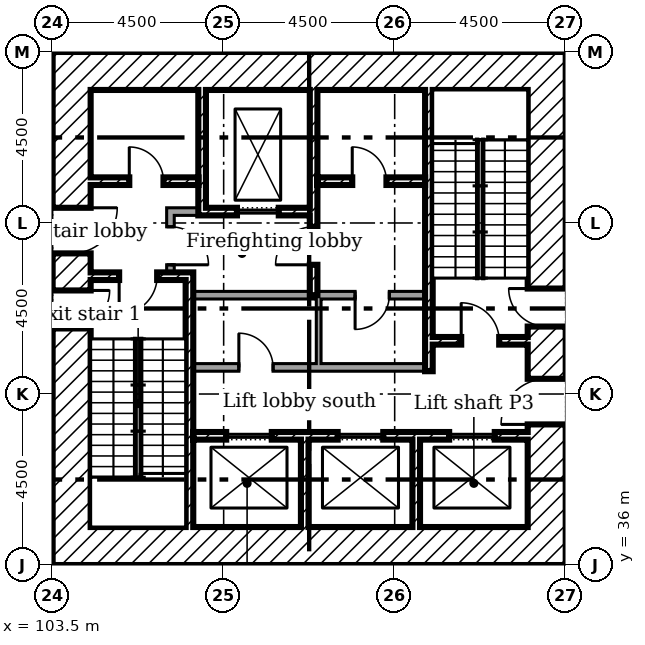
"""IFC4 building model, lengths in metres.
Left out: names, types, materials, properties, quantities, classifications, styles, units other than length and angle.
Written with IfcOpenShell. Run it as: python <this file> out.ifc"""

import sys

from ifc_helpers import new_model, si_unit, direction, frame, frame_2d, origin, place, context, subcontext, project, spatial, rectangle, extrude, element, fill, save


model = new_model("IFC4")
c1 = context("Model", 3, precision=1e-05, world=origin(), true_north=direction((0.0, 1.0)))
c2 = subcontext(c1, "Body", "Model", "MODEL_VIEW")
j1 = project(units=[si_unit("LENGTHUNIT", "METRE"), si_unit("PLANEANGLEUNIT", "RADIAN")], contexts=[c1])
p1 = place(None, origin())
s1 = spatial("IfcSite", under=j1, at=p1, CompositionType="ELEMENT")
p2 = place(p1, origin())
s2 = spatial("IfcBuilding", under=s1, at=p2, CompositionType="ELEMENT")
p3 = place(p2, frame((0.0, 0.0, 11.5)))
s3 = spatial("IfcBuildingStorey", under=s2, at=p3, CompositionType="ELEMENT", Elevation=11.5)
p4 = place(p3, frame((116.5, 36.0, 0.0), z_axis=(0.0, 0.0, 1.0), x_axis=(0.0, 1.0, 0.0)))
e1 = element("IfcWall", 1, at=p4, inside=s3, PredefinedType="SHEAR", context=c2, shape_type="SweptSolid", body=[
    extrude(rectangle(XDim=13.5, YDim=1.0, at=frame_2d((6.75, 0.0))), origin(), (0.0, 0.0, 1.0), 4.5),
])
p5 = place(p4, frame((3.7, 0.0, 0.0)))
e2 = element("IfcOpeningElement", 2, at=p5, cuts=e1, PredefinedType="OPENING", context=c2, shape_type="SweptSolid", body=[
    extrude(rectangle(XDim=1.2, YDim=2.1, at=frame_2d((0.6, 1.05))), frame((0.0, 0.51, 0.0), z_axis=(0.0, -1.0, 0.0), x_axis=(1.0, 0.0, 0.0)), (0.0, 0.0, 1.0), 1.02),
])
p6 = place(p4, frame((6.275, 0.0, 0.0)))
e3 = element("IfcOpeningElement", 3, at=p6, cuts=e1, PredefinedType="OPENING", context=c2, shape_type="SweptSolid", body=[
    extrude(rectangle(XDim=1.0, YDim=2.1, at=frame_2d((0.5, 1.05))), frame((0.0, 0.51, 0.0), z_axis=(0.0, -1.0, 0.0), x_axis=(1.0, 0.0, 0.0)), (0.0, 0.0, 1.0), 1.02),
])
for number, where in (
    (4, (104.5, 49.0, 0.0)),
    (5, (104.5, 36.5, 0.0)),
):
    element("IfcWall", number, at=place(p3, frame(where)), inside=s3, PredefinedType="SHEAR", context=c2, shape_type="SweptSolid", body=[
        extrude(rectangle(XDim=11.5, YDim=1.0, at=frame_2d((5.75, 0.0))), origin(), (0.0, 0.0, 1.0), 4.5),
    ])
p7 = place(p3, frame((104.0, 36.0, 0.0), z_axis=(0.0, 0.0, 1.0), x_axis=(0.0, 1.0, 0.0)))
e6 = element("IfcWall", 6, at=p7, inside=s3, PredefinedType="SHEAR", context=c2, shape_type="SweptSolid", body=[
    extrude(rectangle(XDim=13.5, YDim=1.0, at=frame_2d((6.75, 0.0))), origin(), (0.0, 0.0, 1.0), 4.5),
])
p8 = place(p7, frame((8.2, 0.0, 0.0)))
e7 = element("IfcOpeningElement", 7, at=p8, cuts=e6, PredefinedType="OPENING", context=c2, shape_type="SweptSolid", body=[
    extrude(rectangle(XDim=1.2, YDim=2.1, at=frame_2d((0.6, 1.05))), frame((0.0, 0.51, 0.0), z_axis=(0.0, -1.0, 0.0), x_axis=(1.0, 0.0, 0.0)), (0.0, 0.0, 1.0), 1.02),
])
p9 = place(p7, frame((6.225, 0.0, 0.0)))
e8 = element("IfcOpeningElement", 8, at=p9, cuts=e6, PredefinedType="OPENING", context=c2, shape_type="SweptSolid", body=[
    extrude(rectangle(XDim=1.0, YDim=2.1, at=frame_2d((0.5, 1.05))), frame((0.0, 0.51, 0.0), z_axis=(0.0, -1.0, 0.0), x_axis=(1.0, 0.0, 0.0)), (0.0, 0.0, 1.0), 1.02),
])
p10 = place(p3, frame((107.433, 48.5, 0.0), z_axis=(0.0, 0.0, 1.0), x_axis=(0.0, -1.0, 0.0)))
e9 = element("IfcWall", 9, at=p10, inside=s3, PredefinedType="SHEAR", context=c2, shape_type="SweptSolid", body=[
    extrude(rectangle(XDim=3.3, YDim=0.2, at=frame_2d((1.65, 0.0))), origin(), (0.0, 0.0, 1.0), 4.5),
])
p11 = place(p3, frame((110.367, 48.5, 0.0), z_axis=(0.0, 0.0, 1.0), x_axis=(0.0, -1.0, 0.0)))
e10 = element("IfcWall", 10, at=p11, inside=s3, PredefinedType="SHEAR", context=c2, shape_type="SweptSolid", body=[
    extrude(rectangle(XDim=5.4, YDim=0.2, at=frame_2d((2.7, 0.0))), origin(), (0.0, 0.0, 1.0), 4.5),
])
p12 = place(p11, frame((3.6, 0.0, 0.0)))
e11 = element("IfcOpeningElement", 11, at=p12, cuts=e10, PredefinedType="OPENING", context=c2, shape_type="SweptSolid", body=[
    extrude(rectangle(XDim=1.0, YDim=2.1, at=frame_2d((0.5, 1.05))), frame((0.0, 0.11, 0.0), z_axis=(0.0, -1.0, 0.0), x_axis=(1.0, 0.0, 0.0)), (0.0, 0.0, 1.0), 0.22),
])
for number, where, z_axis, x_axis in (
    (12, (110.133, 37.0, 0.0), (0.0, 0.0, 1.0), (0.0, 1.0, 0.0)),
    (13, (113.067, 37.0, 0.0), (0.0, 0.0, 1.0), (0.0, 1.0, 0.0)),
):
    element("IfcWall", number, at=place(p3, frame(where, z_axis=z_axis, x_axis=x_axis)), inside=s3, PredefinedType="SHEAR", context=c2, shape_type="SweptSolid", body=[
        extrude(rectangle(XDim=2.3, YDim=0.2, at=frame_2d((1.15, 0.0))), origin(), (0.0, 0.0, 1.0), 4.5),
    ])
p13 = place(p3, frame((106.5, 45.3, 0.0)))
e14 = element("IfcWall", 14, at=p13, inside=s3, PredefinedType="PARTITIONING", context=c2, shape_type="SweptSolid", body=[
    extrude(rectangle(XDim=0.833, YDim=0.2, at=frame_2d((0.417, 0.0))), origin(), (0.0, 0.0, 1.0), 4.5),
])
p14 = place(p3, frame((106.6, 43.7, 0.0), z_axis=(0.0, 0.0, 1.0), x_axis=(0.0, 1.0, 0.0)))
e15 = element("IfcWall", 15, at=p14, inside=s3, PredefinedType="PARTITIONING", context=c2, shape_type="SweptSolid", body=[
    extrude(rectangle(XDim=1.5, YDim=0.2, at=frame_2d((0.75, 0.0))), origin(), (0.0, 0.0, 1.0), 4.5),
])
p15 = place(p14, frame((0.2, 0.0, 0.0)))
e16 = element("IfcOpeningElement", 16, at=p15, cuts=e15, PredefinedType="OPENING", context=c2, shape_type="SweptSolid", body=[
    extrude(rectangle(XDim=1.0, YDim=2.1, at=frame_2d((0.5, 1.05))), frame((0.0, 0.11, 0.0), z_axis=(0.0, -1.0, 0.0), x_axis=(1.0, 0.0, 0.0)), (0.0, 0.0, 1.0), 0.22),
])
p16 = place(p3, frame((104.5, 46.1, 0.0)))
e17 = element("IfcWall", 17, at=p16, inside=s3, PredefinedType="SHEAR", context=c2, shape_type="SweptSolid", body=[
    extrude(rectangle(XDim=2.833, YDim=0.2, at=frame_2d((1.417, 0.0))), origin(), (0.0, 0.0, 1.0), 4.5),
])
p17 = place(p16, frame((1.017, 0.0, 0.0)))
e18 = element("IfcOpeningElement", 18, at=p17, cuts=e17, PredefinedType="OPENING", context=c2, shape_type="SweptSolid", body=[
    extrude(rectangle(XDim=0.9, YDim=2.1, at=frame_2d((0.45, 1.05))), frame((0.0, 0.11, 0.0), z_axis=(0.0, -1.0, 0.0), x_axis=(1.0, 0.0, 0.0)), (0.0, 0.0, 1.0), 0.22),
])
p18 = place(p3, frame((110.467, 46.1, 0.0)))
e19 = element("IfcWall", 19, at=p18, inside=s3, PredefinedType="SHEAR", context=c2, shape_type="SweptSolid", body=[
    extrude(rectangle(XDim=2.833, YDim=0.2, at=frame_2d((1.417, 0.0))), origin(), (0.0, 0.0, 1.0), 4.5),
])
p19 = place(p18, frame((0.917, 0.0, 0.0)))
e20 = element("IfcOpeningElement", 20, at=p19, cuts=e19, PredefinedType="OPENING", context=c2, shape_type="SweptSolid", body=[
    extrude(rectangle(XDim=0.9, YDim=2.1, at=frame_2d((0.45, 1.05))), frame((0.0, 0.11, 0.0), z_axis=(0.0, -1.0, 0.0), x_axis=(1.0, 0.0, 0.0)), (0.0, 0.0, 1.0), 0.22),
])
p20 = place(p3, frame((107.533, 45.3, 0.0)))
e21 = element("IfcWall", 21, at=p20, inside=s3, PredefinedType="SHEAR", context=c2, shape_type="SweptSolid", body=[
    extrude(rectangle(XDim=2.733, YDim=0.2, at=frame_2d((1.367, 0.0))), origin(), (0.0, 0.0, 1.0), 4.5),
])
p21 = place(p20, frame((0.817, 0.0, 0.0)))
e22 = element("IfcOpeningElement", 22, at=p21, cuts=e21, PredefinedType="OPENING", context=c2, shape_type="SweptSolid", body=[
    extrude(rectangle(XDim=1.1, YDim=2.1, at=frame_2d((0.55, 1.05))), frame((0.0, 0.11, 0.0), z_axis=(0.0, -1.0, 0.0), x_axis=(1.0, 0.0, 0.0)), (0.0, 0.0, 1.0), 0.22),
])
p22 = place(p3, frame((107.2, 39.4, 0.0)))
e23 = element("IfcWall", 23, at=p22, inside=s3, PredefinedType="SHEAR", context=c2, shape_type="SweptSolid", body=[
    extrude(rectangle(XDim=8.8, YDim=0.2, at=frame_2d((4.4, 0.0))), origin(), (0.0, 0.0, 1.0), 4.5),
])
p23 = place(p22, frame((0.867, 0.0, 0.0)))
e24 = element("IfcOpeningElement", 24, at=p23, cuts=e23, PredefinedType="OPENING", context=c2, shape_type="SweptSolid", body=[
    extrude(rectangle(XDim=1.2, YDim=2.1, at=frame_2d((0.6, 1.05))), frame((0.0, 0.11, 0.0), z_axis=(0.0, -1.0, 0.0), x_axis=(1.0, 0.0, 0.0)), (0.0, 0.0, 1.0), 0.22),
])
p24 = place(p22, frame((3.8, 0.0, 0.0)))
e25 = element("IfcOpeningElement", 25, at=p24, cuts=e23, PredefinedType="OPENING", context=c2, shape_type="SweptSolid", body=[
    extrude(rectangle(XDim=1.2, YDim=2.1, at=frame_2d((0.6, 1.05))), frame((0.0, 0.11, 0.0), z_axis=(0.0, -1.0, 0.0), x_axis=(1.0, 0.0, 0.0)), (0.0, 0.0, 1.0), 0.22),
])
p25 = place(p22, frame((6.733, 0.0, 0.0)))
e26 = element("IfcOpeningElement", 26, at=p25, cuts=e23, PredefinedType="OPENING", context=c2, shape_type="SweptSolid", body=[
    extrude(rectangle(XDim=1.2, YDim=2.1, at=frame_2d((0.6, 1.05))), frame((0.0, 0.11, 0.0), z_axis=(0.0, -1.0, 0.0), x_axis=(1.0, 0.0, 0.0)), (0.0, 0.0, 1.0), 0.22),
])
p26 = place(p3, frame((107.1, 37.0, 0.0), z_axis=(0.0, 0.0, 1.0), x_axis=(0.0, 1.0, 0.0)))
e27 = element("IfcWall", 27, at=p26, inside=s3, PredefinedType="SHEAR", context=c2, shape_type="SweptSolid", body=[
    extrude(rectangle(XDim=6.7, YDim=0.2, at=frame_2d((3.35, 0.0))), origin(), (0.0, 0.0, 1.0), 4.5),
])
p27 = place(p3, frame((104.5, 43.6, 0.0)))
e28 = element("IfcWall", 28, at=p27, inside=s3, PredefinedType="SHEAR", context=c2, shape_type="SweptSolid", body=[
    extrude(rectangle(XDim=2.5, YDim=0.2, at=frame_2d((1.25, 0.0))), origin(), (0.0, 0.0, 1.0), 4.5),
])
p28 = place(p27, frame((0.75, 0.0, 0.0)))
e29 = element("IfcOpeningElement", 29, at=p28, cuts=e28, PredefinedType="OPENING", context=c2, shape_type="SweptSolid", body=[
    extrude(rectangle(XDim=1.0, YDim=2.1, at=frame_2d((0.5, 1.05))), frame((0.0, 0.11, 0.0), z_axis=(0.0, -1.0, 0.0), x_axis=(1.0, 0.0, 0.0)), (0.0, 0.0, 1.0), 0.22),
])
p29 = place(p3, frame((113.5, 41.9, 0.0)))
e30 = element("IfcWall", 30, at=p29, inside=s3, PredefinedType="SHEAR", context=c2, shape_type="SweptSolid", body=[
    extrude(rectangle(XDim=2.5, YDim=0.2, at=frame_2d((1.25, 0.0))), origin(), (0.0, 0.0, 1.0), 4.5),
])
p30 = place(p29, frame((0.75, 0.0, 0.0)))
e31 = element("IfcOpeningElement", 31, at=p30, cuts=e30, PredefinedType="OPENING", context=c2, shape_type="SweptSolid", body=[
    extrude(rectangle(XDim=1.0, YDim=2.1, at=frame_2d((0.5, 1.05))), frame((0.0, 0.11, 0.0), z_axis=(0.0, -1.0, 0.0), x_axis=(1.0, 0.0, 0.0)), (0.0, 0.0, 1.0), 0.22),
])
p31 = place(p3, frame((113.4, 41.1, 0.0), z_axis=(0.0, 0.0, 1.0), x_axis=(0.0, 1.0, 0.0)))
e32 = element("IfcWall", 32, at=p31, inside=s3, PredefinedType="SHEAR", context=c2, shape_type="SweptSolid", body=[
    extrude(rectangle(XDim=7.4, YDim=0.2, at=frame_2d((3.7, 0.0))), origin(), (0.0, 0.0, 1.0), 4.5),
])
p32 = place(p3, frame((107.2, 43.1, 0.0)))
e33 = element("IfcWall", 33, at=p32, inside=s3, PredefinedType="PARTITIONING", context=c2, shape_type="SweptSolid", body=[
    extrude(rectangle(XDim=6.1, YDim=0.2, at=frame_2d((3.05, 0.0))), origin(), (0.0, 0.0, 1.0), 4.5),
])
p33 = place(p32, frame((4.259, 0.0, 0.0)))
e34 = element("IfcOpeningElement", 34, at=p33, cuts=e33, PredefinedType="OPENING", context=c2, shape_type="SweptSolid", body=[
    extrude(rectangle(XDim=0.9, YDim=2.1, at=frame_2d((0.45, 1.05))), frame((0.0, 0.11, 0.0), z_axis=(0.0, -1.0, 0.0), x_axis=(1.0, 0.0, 0.0)), (0.0, 0.0, 1.0), 0.22),
])
p34 = place(p3, frame((107.2, 41.2, 0.0)))
e35 = element("IfcWall", 35, at=p34, inside=s3, PredefinedType="PARTITIONING", context=c2, shape_type="SweptSolid", body=[
    extrude(rectangle(XDim=6.1, YDim=0.2, at=frame_2d((3.05, 0.0))), origin(), (0.0, 0.0, 1.0), 4.5),
])
p35 = place(p34, frame((1.2, 0.0, 0.0)))
e36 = element("IfcOpeningElement", 36, at=p35, cuts=e35, PredefinedType="OPENING", context=c2, shape_type="SweptSolid", body=[
    extrude(rectangle(XDim=0.9, YDim=2.1, at=frame_2d((0.45, 1.05))), frame((0.0, 0.11, 0.0), z_axis=(0.0, -1.0, 0.0), x_axis=(1.0, 0.0, 0.0)), (0.0, 0.0, 1.0), 0.22),
])
p36 = place(p3, frame((110.5, 41.3, 0.0), z_axis=(0.0, 0.0, 1.0), x_axis=(0.0, 1.0, 0.0)))
e37 = element("IfcWall", 37, at=p36, inside=s3, PredefinedType="PARTITIONING", context=c2, shape_type="SweptSolid", body=[
    extrude(rectangle(XDim=1.7, YDim=0.125, at=frame_2d((0.85, 0.0))), origin(), (0.0, 0.0, 1.0), 4.5),
])
p37 = place(p8, frame((1.2, 0.0, 0.0), x_axis=(-1.0, 0.0, 0.0)))
e38 = element("IfcDoor", 38, at=p37, inside=s3, OperationType="SINGLE_SWING_RIGHT", PredefinedType="DOOR", context=c2, shape_type="SweptSolid", body=[
    extrude(rectangle(XDim=1.2, YDim=2.1, at=frame_2d((0.6, 1.05))), frame((0.0, 0.025, 0.0), z_axis=(0.0, -1.0, 0.0), x_axis=(1.0, 0.0, 0.0)), (0.0, 0.0, 1.0), 0.05),
])
fill(e7, e38)
p38 = place(p5, origin())
e39 = element("IfcDoor", 39, at=p38, inside=s3, OperationType="SINGLE_SWING_RIGHT", PredefinedType="DOOR", context=c2, shape_type="SweptSolid", body=[
    extrude(rectangle(XDim=1.2, YDim=2.1, at=frame_2d((0.6, 1.05))), frame((0.0, 0.025, 0.0), z_axis=(0.0, -1.0, 0.0), x_axis=(1.0, 0.0, 0.0)), (0.0, 0.0, 1.0), 0.05),
])
fill(e2, e39)
p39 = place(p28, frame((1.0, 0.0, 0.0), x_axis=(-1.0, 0.0, 0.0)))
e40 = element("IfcDoor", 40, at=p39, inside=s3, OperationType="SINGLE_SWING_LEFT", PredefinedType="DOOR", context=c2, shape_type="SweptSolid", body=[
    extrude(rectangle(XDim=1.0, YDim=2.1, at=frame_2d((0.5, 1.05))), frame((0.0, 0.025, 0.0), z_axis=(0.0, -1.0, 0.0), x_axis=(1.0, 0.0, 0.0)), (0.0, 0.0, 1.0), 0.05),
])
fill(e29, e40)
p40 = place(p9, frame((1.0, 0.0, 0.0), x_axis=(-1.0, 0.0, 0.0)))
e41 = element("IfcDoor", 41, at=p40, inside=s3, OperationType="SINGLE_SWING_RIGHT", PredefinedType="DOOR", context=c2, shape_type="SweptSolid", body=[
    extrude(rectangle(XDim=1.0, YDim=2.1, at=frame_2d((0.5, 1.05))), frame((0.0, 0.025, 0.0), z_axis=(0.0, -1.0, 0.0), x_axis=(1.0, 0.0, 0.0)), (0.0, 0.0, 1.0), 0.05),
])
fill(e8, e41)
p41 = place(p30, origin())
e42 = element("IfcDoor", 42, at=p41, inside=s3, OperationType="SINGLE_SWING_RIGHT", PredefinedType="DOOR", context=c2, shape_type="SweptSolid", body=[
    extrude(rectangle(XDim=1.0, YDim=2.1, at=frame_2d((0.5, 1.05))), frame((0.0, 0.025, 0.0), z_axis=(0.0, -1.0, 0.0), x_axis=(1.0, 0.0, 0.0)), (0.0, 0.0, 1.0), 0.05),
])
fill(e31, e42)
p42 = place(p6, origin())
e43 = element("IfcDoor", 43, at=p42, inside=s3, OperationType="SINGLE_SWING_LEFT", PredefinedType="DOOR", context=c2, shape_type="SweptSolid", body=[
    extrude(rectangle(XDim=1.0, YDim=2.1, at=frame_2d((0.5, 1.05))), frame((0.0, 0.025, 0.0), z_axis=(0.0, -1.0, 0.0), x_axis=(1.0, 0.0, 0.0)), (0.0, 0.0, 1.0), 0.05),
])
fill(e3, e43)
p43 = place(p12, frame((1.0, 0.0, 0.0), x_axis=(-1.0, 0.0, 0.0)))
e44 = element("IfcDoor", 44, at=p43, inside=s3, OperationType="SINGLE_SWING_RIGHT", PredefinedType="DOOR", context=c2, shape_type="SweptSolid", body=[
    extrude(rectangle(XDim=1.0, YDim=2.1, at=frame_2d((0.5, 1.05))), frame((0.0, 0.025, 0.0), z_axis=(0.0, -1.0, 0.0), x_axis=(1.0, 0.0, 0.0)), (0.0, 0.0, 1.0), 0.05),
])
fill(e11, e44)
p44 = place(p15, frame((1.0, 0.0, 0.0), x_axis=(-1.0, 0.0, 0.0)))
e45 = element("IfcDoor", 45, at=p44, inside=s3, OperationType="SINGLE_SWING_LEFT", PredefinedType="DOOR", context=c2, shape_type="SweptSolid", body=[
    extrude(rectangle(XDim=1.0, YDim=2.1, at=frame_2d((0.5, 1.05))), frame((0.0, 0.025, 0.0), z_axis=(0.0, -1.0, 0.0), x_axis=(1.0, 0.0, 0.0)), (0.0, 0.0, 1.0), 0.05),
])
fill(e16, e45)
p45 = place(p17, origin())
e46 = element("IfcDoor", 46, at=p45, inside=s3, OperationType="SINGLE_SWING_RIGHT", PredefinedType="DOOR", context=c2, shape_type="SweptSolid", body=[
    extrude(rectangle(XDim=0.9, YDim=2.1, at=frame_2d((0.45, 1.05))), frame((0.0, 0.025, 0.0), z_axis=(0.0, -1.0, 0.0), x_axis=(1.0, 0.0, 0.0)), (0.0, 0.0, 1.0), 0.05),
])
fill(e18, e46)
p46 = place(p19, origin())
e47 = element("IfcDoor", 47, at=p46, inside=s3, OperationType="SINGLE_SWING_RIGHT", PredefinedType="DOOR", context=c2, shape_type="SweptSolid", body=[
    extrude(rectangle(XDim=0.9, YDim=2.1, at=frame_2d((0.45, 1.05))), frame((0.0, 0.025, 0.0), z_axis=(0.0, -1.0, 0.0), x_axis=(1.0, 0.0, 0.0)), (0.0, 0.0, 1.0), 0.05),
])
fill(e20, e47)
p47 = place(p35, origin())
e48 = element("IfcDoor", 48, at=p47, inside=s3, OperationType="SINGLE_SWING_RIGHT", PredefinedType="DOOR", context=c2, shape_type="SweptSolid", body=[
    extrude(rectangle(XDim=0.9, YDim=2.1, at=frame_2d((0.45, 1.05))), frame((0.0, 0.025, 0.0), z_axis=(0.0, -1.0, 0.0), x_axis=(1.0, 0.0, 0.0)), (0.0, 0.0, 1.0), 0.05),
])
fill(e36, e48)
p48 = place(p33, frame((0.9, 0.0, 0.0), x_axis=(-1.0, 0.0, 0.0)))
e49 = element("IfcDoor", 49, at=p48, inside=s3, OperationType="SINGLE_SWING_LEFT", PredefinedType="DOOR", context=c2, shape_type="SweptSolid", body=[
    extrude(rectangle(XDim=0.9, YDim=2.1, at=frame_2d((0.45, 1.05))), frame((0.0, 0.025, 0.0), z_axis=(0.0, -1.0, 0.0), x_axis=(1.0, 0.0, 0.0)), (0.0, 0.0, 1.0), 0.05),
])
fill(e34, e49)
p49 = place(p21, origin())
e50 = element("IfcDoor", 50, at=p49, inside=s3, OperationType="SLIDING_TO_LEFT", PredefinedType="DOOR", context=c2, shape_type="SweptSolid", body=[
    extrude(rectangle(XDim=1.1, YDim=2.1, at=frame_2d((0.55, 1.05))), frame((0.0, 0.025, 0.0), z_axis=(0.0, -1.0, 0.0), x_axis=(1.0, 0.0, 0.0)), (0.0, 0.0, 1.0), 0.05),
])
fill(e22, e50)
p50 = place(p23, origin())
e51 = element("IfcDoor", 51, at=p50, inside=s3, OperationType="SLIDING_TO_LEFT", PredefinedType="DOOR", context=c2, shape_type="SweptSolid", body=[
    extrude(rectangle(XDim=1.2, YDim=2.1, at=frame_2d((0.6, 1.05))), frame((0.0, 0.025, 0.0), z_axis=(0.0, -1.0, 0.0), x_axis=(1.0, 0.0, 0.0)), (0.0, 0.0, 1.0), 0.05),
])
fill(e24, e51)
p51 = place(p24, origin())
e52 = element("IfcDoor", 52, at=p51, inside=s3, OperationType="SLIDING_TO_LEFT", PredefinedType="DOOR", context=c2, shape_type="SweptSolid", body=[
    extrude(rectangle(XDim=1.2, YDim=2.1, at=frame_2d((0.6, 1.05))), frame((0.0, 0.025, 0.0), z_axis=(0.0, -1.0, 0.0), x_axis=(1.0, 0.0, 0.0)), (0.0, 0.0, 1.0), 0.05),
])
fill(e25, e52)
p52 = place(p25, origin())
e53 = element("IfcDoor", 53, at=p52, inside=s3, OperationType="SLIDING_TO_LEFT", PredefinedType="DOOR", context=c2, shape_type="SweptSolid", body=[
    extrude(rectangle(XDim=1.2, YDim=2.1, at=frame_2d((0.6, 1.05))), frame((0.0, 0.025, 0.0), z_axis=(0.0, -1.0, 0.0), x_axis=(1.0, 0.0, 0.0)), (0.0, 0.0, 1.0), 0.05),
])
fill(e26, e53)
save(model, sys.argv[1])
